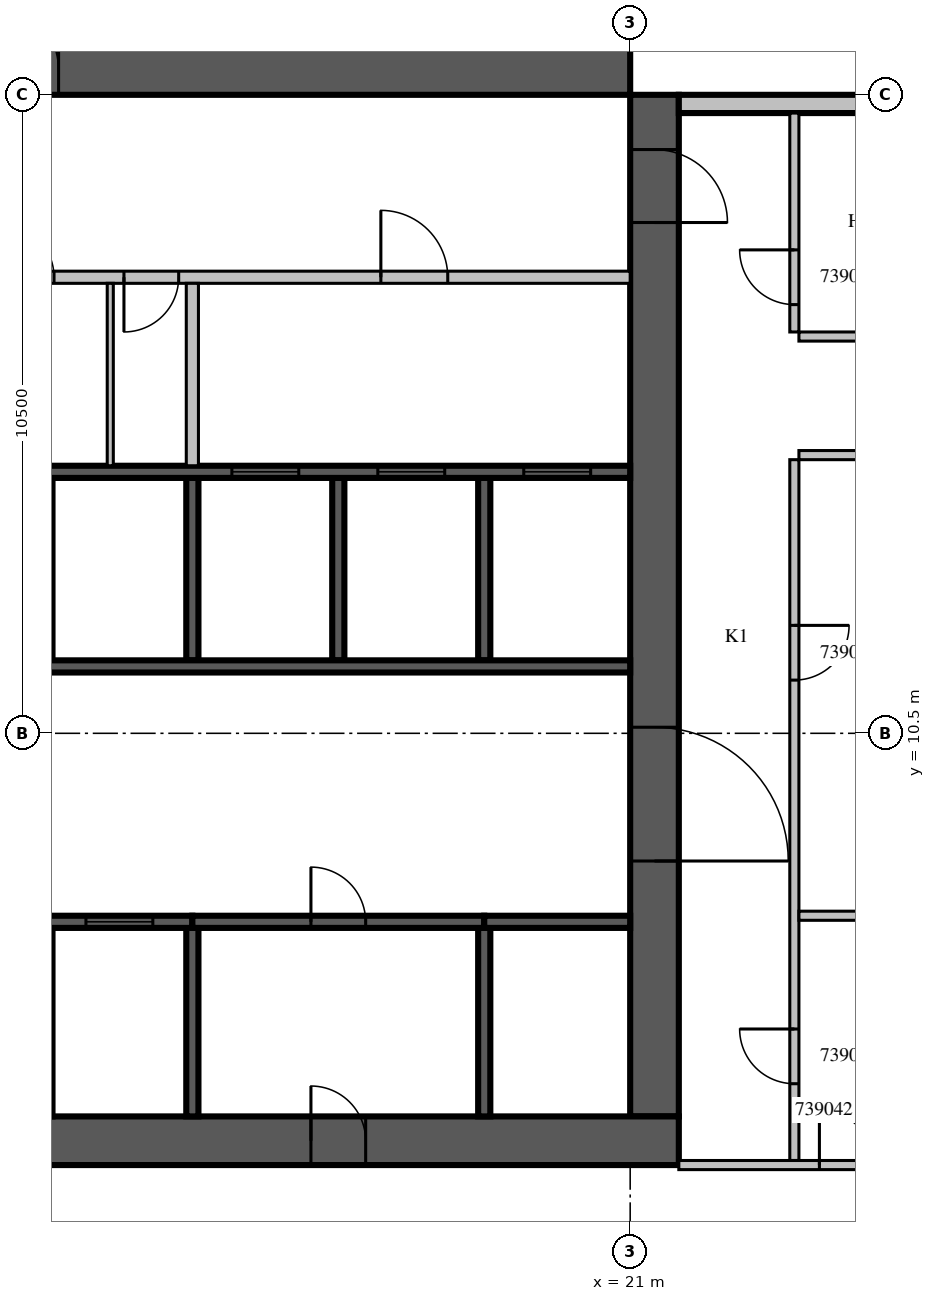
"""IFC4 building model, lengths in metres.
Left out: names, types, materials, properties, quantities, classifications, styles, units other than length and angle.
Written with IfcOpenShell. Run it as: python <this file> out.ifc"""

import sys

from ifc_helpers import new_model, si_unit, direction, frame, frame_2d, origin, place, context, subcontext, project, spatial, rectangle, extrude, source, transform, mapped, element, fill, save


model = new_model("IFC4")
c1 = context("Model", 3, precision=1e-05, world=origin(), true_north=direction((0.0, 1.0)))
c2 = subcontext(c1, "Body", "Model", "MODEL_VIEW")
j1 = project(units=[si_unit("LENGTHUNIT", "METRE"), si_unit("PLANEANGLEUNIT", "RADIAN")], contexts=[c1])
p1 = place(None, origin())
s1 = spatial("IfcSite", under=j1, at=p1, CompositionType="ELEMENT")
p2 = place(p1, origin())
s2 = spatial("IfcBuilding", under=s1, at=p2, CompositionType="ELEMENT")
p3 = place(p2, frame((0.0, 0.0, 181.6)))
s3 = spatial("IfcBuildingStorey", under=s2, at=p3, CompositionType="ELEMENT", Elevation=181.6)
m1 = source(origin(), c2, "Body", "SweptSolid", [
    extrude(rectangle(XDim=16.8, YDim=0.8, at=frame_2d((8.4, 0.0))), origin(), (0.0, 0.0, 1.0), 3.8),
])
p4 = place(p3, frame((21.4, 4.2, 0.0), z_axis=(0.0, 0.0, 1.0), x_axis=(0.0, 1.0, 0.0)))
e1 = element("IfcWall", 1, at=p4, inside=s3, PredefinedType="SHEAR", context=c2, shape_type="MappedRepresentation", body=[
    mapped(m1, transform((0.0, 0.0, 0.0), scale=1.0)),
])
m2 = source(origin(), c2, "Body", "SweptSolid", [
    extrude(rectangle(XDim=2.2, YDim=2.1, at=frame_2d((1.1, 1.05))), frame((0.0, 0.41, 0.0), z_axis=(0.0, -1.0, 0.0), x_axis=(1.0, 0.0, 0.0)), (0.0, 0.0, 1.0), 0.82),
])
p5 = place(p4, frame((4.2, 0.0, 0.0)))
e2 = element("IfcOpeningElement", 2, at=p5, cuts=e1, PredefinedType="OPENING", context=c2, shape_type="MappedRepresentation", body=[
    mapped(m2, transform((0.0, 0.0, 0.0), scale=1.0)),
])
m3 = source(origin(), c2, "Body", "SweptSolid", [
    extrude(rectangle(XDim=1.2, YDim=2.1, at=frame_2d((0.6, 1.05))), frame((0.0, 0.41, 0.0), z_axis=(0.0, -1.0, 0.0), x_axis=(1.0, 0.0, 0.0)), (0.0, 0.0, 1.0), 0.82),
])
p6 = place(p4, frame((14.7, 0.0, 0.0)))
e3 = element("IfcOpeningElement", 3, at=p6, cuts=e1, PredefinedType="OPENING", context=c2, shape_type="MappedRepresentation", body=[
    mapped(m3, transform((0.0, 0.0, 0.0), scale=1.0)),
])
m4 = source(origin(), c2, "Body", "SweptSolid", [
    extrude(rectangle(XDim=17.6, YDim=0.8, at=frame_2d((8.8, 0.0))), origin(), (0.0, 0.0, 1.0), 3.8),
])
p7 = place(p3, frame((4.2, 3.8, 0.0), z_axis=(0.0, 0.0, 1.0), x_axis=(1.0, 0.0, 0.0)))
e4 = element("IfcWall", 4, at=p7, inside=s3, PredefinedType="SHEAR", context=c2, shape_type="MappedRepresentation", body=[
    mapped(m4, transform((0.0, 0.0, 0.0), scale=1.0)),
])
m5 = source(origin(), c2, "Body", "SweptSolid", [
    extrude(rectangle(XDim=0.9, YDim=2.1, at=frame_2d((0.45, 1.05))), frame((0.0, 0.41, 0.0), z_axis=(0.0, -1.0, 0.0), x_axis=(1.0, 0.0, 0.0)), (0.0, 0.0, 1.0), 0.82),
])
p8 = place(p7, frame((11.55, 0.0, 0.0)))
e5 = element("IfcOpeningElement", 5, at=p8, cuts=e4, PredefinedType="OPENING", context=c2, shape_type="MappedRepresentation", body=[
    mapped(m5, transform((0.0, 0.0, 0.0), scale=1.0)),
])
p9 = place(p3, frame((4.2, 21.4, 0.0), z_axis=(0.0, 0.0, 1.0), x_axis=(1.0, 0.0, 0.0)))
e6 = element("IfcWall", 6, at=p9, inside=s3, PredefinedType="SHEAR", context=c2, shape_type="MappedRepresentation", body=[
    mapped(m1, transform((0.0, 0.0, 0.0), scale=1.0)),
])
p10 = place(p9, frame((6.2, 0.0, 0.0)))
e7 = element("IfcOpeningElement", 7, at=p10, cuts=e6, PredefinedType="OPENING", context=c2, shape_type="MappedRepresentation", body=[
    mapped(m3, transform((0.0, 0.0, 0.0), scale=1.0)),
])
m6 = source(origin(), c2, "Body", "SweptSolid", [
    extrude(rectangle(XDim=7.15, YDim=0.3, at=frame_2d((3.575, 0.0))), origin(), (0.0, 0.0, 1.0), 3.4),
])
p11 = place(p3, frame((28.95, 20.85, 0.0), z_axis=(0.0, 0.0, 1.0), x_axis=(-1.0, 0.0, 0.0)))
e8 = element("IfcWall", 8, at=p11, inside=s3, PredefinedType="STANDARD", context=c2, shape_type="MappedRepresentation", body=[
    mapped(m6, transform((0.0, 0.0, 0.0), scale=1.0)),
])
m7 = source(origin(), c2, "Body", "SweptSolid", [
    extrude(rectangle(XDim=3.0, YDim=2.3, at=frame_2d((1.5, 1.15))), frame((0.0, 0.16, 0.0), z_axis=(0.0, -1.0, 0.0), x_axis=(1.0, 0.0, 0.0)), (0.0, 0.0, 1.0), 0.32),
])
p12 = place(p11, frame((0.15, 0.0, 0.6)))
e9 = element("IfcOpeningElement", 9, at=p12, cuts=e8, PredefinedType="OPENING", context=c2, shape_type="MappedRepresentation", body=[
    mapped(m7, transform((0.0, 0.0, 0.0), scale=1.0)),
])
m8 = source(origin(), c2, "Body", "SweptSolid", [
    extrude(rectangle(XDim=3.1, YDim=0.2, at=frame_2d((1.55, 0.0))), origin(), (0.0, 0.0, 1.0), 3.4),
])
for number, where, z_axis, x_axis in (
    (10, (13.8, 4.2, 0.0), (0.0, 0.0, 1.0), (0.0, 1.0, 0.0)),
    (11, (18.6, 4.2, 0.0), (0.0, 0.0, 1.0), (0.0, 1.0, 0.0)),
):
    element("IfcWall", number, at=place(p3, frame(where, z_axis=z_axis, x_axis=x_axis)), inside=s3, PredefinedType="SOLIDWALL", context=c2, shape_type="MappedRepresentation", body=[
        mapped(m8, transform((0.0, 0.0, 0.0), scale=1.0)),
    ])
m9 = source(origin(), c2, "Body", "SweptSolid", [
    extrude(rectangle(XDim=3.0, YDim=0.2, at=frame_2d((1.5, 0.0))), origin(), (0.0, 0.0, 1.0), 3.8),
])
for number, where, z_axis, x_axis in (
    (12, (13.8, 11.7, 0.0), (0.0, 0.0, 1.0), (0.0, 1.0, 0.0)),
    (13, (16.2, 11.7, 0.0), (0.0, 0.0, 1.0), (0.0, 1.0, 0.0)),
    (14, (18.6, 11.7, 0.0), (0.0, 0.0, 1.0), (0.0, 1.0, 0.0)),
):
    element("IfcWall", number, at=place(p3, frame(where, z_axis=z_axis, x_axis=x_axis)), inside=s3, PredefinedType="SOLIDWALL", context=c2, shape_type="MappedRepresentation", body=[
        mapped(m9, transform((0.0, 0.0, 0.0), scale=1.0)),
    ])
m10 = source(origin(), c2, "Body", "SweptSolid", [
    extrude(rectangle(XDim=9.6, YDim=0.2, at=frame_2d((4.8, 0.0))), origin(), (0.0, 0.0, 1.0), 3.8),
])
p13 = place(p3, frame((4.2, 7.4, 0.0), z_axis=(0.0, 0.0, 1.0), x_axis=(1.0, 0.0, 0.0)))
e15 = element("IfcWall", 15, at=p13, inside=s3, PredefinedType="SOLIDWALL", context=c2, shape_type="MappedRepresentation", body=[
    mapped(m10, transform((0.0, 0.0, 0.0), scale=1.0)),
])
m11 = source(origin(), c2, "Body", "SweptSolid", [
    extrude(rectangle(XDim=1.1, YDim=2.1, at=frame_2d((0.55, 1.05))), frame((0.0, 0.11, 0.0), z_axis=(0.0, -1.0, 0.0), x_axis=(1.0, 0.0, 0.0)), (0.0, 0.0, 1.0), 0.22),
])
p14 = place(p13, frame((0.65, 0.0, 0.0)))
e16 = element("IfcOpeningElement", 16, at=p14, cuts=e15, PredefinedType="OPENING", context=c2, shape_type="MappedRepresentation", body=[
    mapped(m11, transform((0.0, 0.0, 0.0), scale=1.0)),
])
p15 = place(p13, frame((3.05, 0.0, 0.0)))
e17 = element("IfcOpeningElement", 17, at=p15, cuts=e15, PredefinedType="OPENING", context=c2, shape_type="MappedRepresentation", body=[
    mapped(m11, transform((0.0, 0.0, 0.0), scale=1.0)),
])
p16 = place(p13, frame((5.45, 0.0, 0.0)))
e18 = element("IfcOpeningElement", 18, at=p16, cuts=e15, PredefinedType="OPENING", context=c2, shape_type="MappedRepresentation", body=[
    mapped(m11, transform((0.0, 0.0, 0.0), scale=1.0)),
])
p17 = place(p13, frame((7.85, 0.0, 0.0)))
e19 = element("IfcOpeningElement", 19, at=p17, cuts=e15, PredefinedType="OPENING", context=c2, shape_type="MappedRepresentation", body=[
    mapped(m11, transform((0.0, 0.0, 0.0), scale=1.0)),
])
m12 = source(origin(), c2, "Body", "SweptSolid", [
    extrude(rectangle(XDim=4.8, YDim=0.2, at=frame_2d((2.4, 0.0))), origin(), (0.0, 0.0, 1.0), 3.4),
])
p18 = place(p3, frame((13.8, 7.4, 0.0), z_axis=(0.0, 0.0, 1.0), x_axis=(1.0, 0.0, 0.0)))
e20 = element("IfcWall", 20, at=p18, inside=s3, PredefinedType="SOLIDWALL", context=c2, shape_type="MappedRepresentation", body=[
    mapped(m12, transform((0.0, 0.0, 0.0), scale=1.0)),
])
m13 = source(origin(), c2, "Body", "SweptSolid", [
    extrude(rectangle(XDim=0.9, YDim=2.1, at=frame_2d((0.45, 1.05))), frame((0.0, 0.11, 0.0), z_axis=(0.0, -1.0, 0.0), x_axis=(1.0, 0.0, 0.0)), (0.0, 0.0, 1.0), 0.22),
])
p19 = place(p18, frame((1.95, 0.0, 0.0)))
e21 = element("IfcOpeningElement", 21, at=p19, cuts=e20, PredefinedType="OPENING", context=c2, shape_type="MappedRepresentation", body=[
    mapped(m13, transform((0.0, 0.0, 0.0), scale=1.0)),
])
m14 = source(origin(), c2, "Body", "SweptSolid", [
    extrude(rectangle(XDim=2.4, YDim=0.2, at=frame_2d((1.2, 0.0))), origin(), (0.0, 0.0, 1.0), 3.8),
])
p20 = place(p3, frame((18.6, 7.4, 0.0), z_axis=(0.0, 0.0, 1.0), x_axis=(1.0, 0.0, 0.0)))
e22 = element("IfcWall", 22, at=p20, inside=s3, PredefinedType="SOLIDWALL", context=c2, shape_type="MappedRepresentation", body=[
    mapped(m14, transform((0.0, 0.0, 0.0), scale=1.0)),
])
p21 = place(p3, frame((11.4, 11.6, 0.0), z_axis=(0.0, 0.0, 1.0), x_axis=(1.0, 0.0, 0.0)))
e23 = element("IfcWall", 23, at=p21, inside=s3, PredefinedType="SOLIDWALL", context=c2, shape_type="MappedRepresentation", body=[
    mapped(m10, transform((0.0, 0.0, 0.0), scale=1.0)),
])
p22 = place(p3, frame((11.4, 14.8, 0.0), z_axis=(0.0, 0.0, 1.0), x_axis=(1.0, 0.0, 0.0)))
e24 = element("IfcWall", 24, at=p22, inside=s3, PredefinedType="SOLIDWALL", context=c2, shape_type="MappedRepresentation", body=[
    mapped(m10, transform((0.0, 0.0, 0.0), scale=1.0)),
])
p23 = place(p22, frame((3.05, 0.0, 0.0)))
e25 = element("IfcOpeningElement", 25, at=p23, cuts=e24, PredefinedType="OPENING", context=c2, shape_type="MappedRepresentation", body=[
    mapped(m11, transform((0.0, 0.0, 0.0), scale=1.0)),
])
p24 = place(p22, frame((5.45, 0.0, 0.0)))
e26 = element("IfcOpeningElement", 26, at=p24, cuts=e24, PredefinedType="OPENING", context=c2, shape_type="MappedRepresentation", body=[
    mapped(m11, transform((0.0, 0.0, 0.0), scale=1.0)),
])
p25 = place(p22, frame((7.85, 0.0, 0.0)))
e27 = element("IfcOpeningElement", 27, at=p25, cuts=e24, PredefinedType="OPENING", context=c2, shape_type="MappedRepresentation", body=[
    mapped(m11, transform((0.0, 0.0, 0.0), scale=1.0)),
])
m15 = source(origin(), c2, "Body", "SweptSolid", [
    extrude(rectangle(XDim=11.45, YDim=0.2, at=frame_2d((5.725, 0.0))), origin(), (0.0, 0.0, 1.0), 3.4),
])
p26 = place(p3, frame((9.55, 18.0, 0.0), z_axis=(0.0, 0.0, 1.0), x_axis=(1.0, 0.0, 0.0)))
e28 = element("IfcWall", 28, at=p26, inside=s3, PredefinedType="PARTITIONING", context=c2, shape_type="MappedRepresentation", body=[
    mapped(m15, transform((0.0, 0.0, 0.0), scale=1.0)),
])
p27 = place(p26, frame((1.075, 0.0, 0.0)))
e29 = element("IfcOpeningElement", 29, at=p27, cuts=e28, PredefinedType="OPENING", context=c2, shape_type="MappedRepresentation", body=[
    mapped(m13, transform((0.0, 0.0, 0.0), scale=1.0)),
])
p28 = place(p26, frame((3.125, 0.0, 0.0)))
e30 = element("IfcOpeningElement", 30, at=p28, cuts=e28, PredefinedType="OPENING", context=c2, shape_type="MappedRepresentation", body=[
    mapped(m13, transform((0.0, 0.0, 0.0), scale=1.0)),
])
p29 = place(p26, frame((7.35, 0.0, 0.0)))
e31 = element("IfcOpeningElement", 31, at=p29, cuts=e28, PredefinedType="OPENING", context=c2, shape_type="MappedRepresentation", body=[
    mapped(m11, transform((0.0, 0.0, 0.0), scale=1.0)),
])
m16 = source(origin(), c2, "Body", "SweptSolid", [
    extrude(rectangle(XDim=3.0, YDim=0.2, at=frame_2d((1.5, 0.0))), origin(), (0.0, 0.0, 1.0), 3.4),
])
p30 = place(p3, frame((13.8, 14.9, 0.0), z_axis=(0.0, 0.0, 1.0), x_axis=(0.0, 1.0, 0.0)))
e32 = element("IfcWall", 32, at=p30, inside=s3, PredefinedType="PARTITIONING", context=c2, shape_type="MappedRepresentation", body=[
    mapped(m16, transform((0.0, 0.0, 0.0), scale=1.0)),
])
m17 = source(origin(), c2, "Body", "SweptSolid", [
    extrude(rectangle(XDim=3.0, YDim=0.1, at=frame_2d((1.5, 0.0))), origin(), (0.0, 0.0, 1.0), 3.4),
])
p31 = place(p3, frame((12.45, 14.9, 0.0), z_axis=(0.0, 0.0, 1.0), x_axis=(0.0, 1.0, 0.0)))
e33 = element("IfcWall", 33, at=p31, inside=s3, PredefinedType="PARTITIONING", context=c2, shape_type="MappedRepresentation", body=[
    mapped(m17, transform((0.0, 0.0, 0.0), scale=1.0)),
])
p32 = place(p3, frame((23.7, 15.0, 0.0), z_axis=(0.0, 0.0, 1.0), x_axis=(0.0, -1.0, 0.0)))
e34 = element("IfcWall", 34, at=p32, inside=s3, PredefinedType="PARTITIONING", context=c2, shape_type="SweptSolid", body=[
    extrude(rectangle(XDim=11.525, YDim=0.15, at=frame_2d((5.763, 0.0))), origin(), (0.0, 0.0, 1.0), 3.4),
])
m18 = source(origin(), c2, "Body", "SweptSolid", [
    extrude(rectangle(XDim=0.9, YDim=2.1, at=frame_2d((0.45, 1.05))), frame((0.0, 0.085, 0.0), z_axis=(0.0, -1.0, 0.0), x_axis=(1.0, 0.0, 0.0)), (0.0, 0.0, 1.0), 0.17),
])
p33 = place(p32, frame((9.363, 0.0, 0.0)))
e35 = element("IfcOpeningElement", 35, at=p33, cuts=e34, PredefinedType="OPENING", context=c2, shape_type="MappedRepresentation", body=[
    mapped(m18, transform((0.0, 0.0, 0.0), scale=1.0)),
])
p34 = place(p32, frame((2.725, 0.0, 0.0)))
e36 = element("IfcOpeningElement", 36, at=p34, cuts=e34, PredefinedType="OPENING", context=c2, shape_type="MappedRepresentation", body=[
    mapped(m18, transform((0.0, 0.0, 0.0), scale=1.0)),
])
m19 = source(origin(), c2, "Body", "SweptSolid", [
    extrude(rectangle(XDim=3.6, YDim=0.15, at=frame_2d((1.8, 0.0))), origin(), (0.0, 0.0, 1.0), 3.4),
])
p35 = place(p3, frame((23.7, 20.7, 0.0), z_axis=(0.0, 0.0, 1.0), x_axis=(0.0, -1.0, 0.0)))
e37 = element("IfcWall", 37, at=p35, inside=s3, PredefinedType="PARTITIONING", context=c2, shape_type="MappedRepresentation", body=[
    mapped(m19, transform((0.0, 0.0, 0.0), scale=1.0)),
])
p36 = place(p35, frame((2.25, 0.0, 0.0)))
e38 = element("IfcOpeningElement", 38, at=p36, cuts=e37, PredefinedType="OPENING", context=c2, shape_type="MappedRepresentation", body=[
    mapped(m18, transform((0.0, 0.0, 0.0), scale=1.0)),
])
m20 = source(origin(), c2, "Body", "SweptSolid", [
    extrude(rectangle(XDim=5.55, YDim=0.15, at=frame_2d((2.775, 0.0))), origin(), (0.0, 0.0, 1.0), 3.4),
])
for number, where, z_axis, x_axis in (
    (39, (29.325, 7.5, 0.0), (0.0, 0.0, 1.0), (-1.0, 0.0, 0.0)),
    (40, (29.325, 15.075, 0.0), (0.0, 0.0, 1.0), (-1.0, 0.0, 0.0)),
    (41, (23.775, 17.025, 0.0), (0.0, 0.0, 1.0), (1.0, 0.0, 0.0)),
):
    element("IfcWall", number, at=place(p3, frame(where, z_axis=z_axis, x_axis=x_axis)), inside=s3, PredefinedType="PARTITIONING", context=c2, shape_type="MappedRepresentation", body=[
        mapped(m20, transform((0.0, 0.0, 0.0), scale=1.0)),
    ])
p37 = place(p3, frame((21.8, 3.4, 0.0), z_axis=(0.0, 0.0, 1.0), x_axis=(1.0, 0.0, 0.0)))
e42 = element("IfcWall", 42, at=p37, inside=s3, PredefinedType="PARTITIONING", context=c2, shape_type="SweptSolid", body=[
    extrude(rectangle(XDim=7.525, YDim=0.15, at=frame_2d((3.763, 0.0))), origin(), (0.0, 0.0, 1.0), 3.4),
])
m21 = source(origin(), c2, "Body", "SweptSolid", [
    extrude(rectangle(XDim=1.0, YDim=2.1, at=frame_2d((0.5, 1.05))), frame((0.0, 0.085, 0.0), z_axis=(0.0, -1.0, 0.0), x_axis=(1.0, 0.0, 0.0)), (0.0, 0.0, 1.0), 0.17),
])
p38 = place(p37, frame((3.3, 0.0, 0.0)))
e43 = element("IfcOpeningElement", 43, at=p38, cuts=e42, PredefinedType="OPENING", context=c2, shape_type="MappedRepresentation", body=[
    mapped(m21, transform((0.0, 0.0, 0.0), scale=1.0)),
])
p39 = place(p37, frame((2.312, 0.0, 0.0)))
e44 = element("IfcOpeningElement", 44, at=p39, cuts=e42, PredefinedType="OPENING", context=c2, shape_type="MappedRepresentation", body=[
    mapped(m18, transform((0.0, 0.0, 0.0), scale=1.0)),
])
m22 = source(origin(), c2, "Body", "SweptSolid", [
    extrude(rectangle(XDim=1.1, YDim=2.1, at=frame_2d((0.55, 1.05))), frame((0.0, 0.025, 0.0), z_axis=(0.0, -1.0, 0.0), x_axis=(1.0, 0.0, 0.0)), (0.0, 0.0, 1.0), 0.05),
])
p40 = place(p17, origin())
e45 = element("IfcDoor", 45, at=p40, inside=s3, OperationType="SLIDING_TO_LEFT", PredefinedType="DOOR", context=c2, shape_type="MappedRepresentation", body=[
    mapped(m22, transform((0.0, 0.0, 0.0), scale=1.0)),
])
fill(e19, e45)
m23 = source(origin(), c2, "Body", "SweptSolid", [
    extrude(rectangle(XDim=0.9, YDim=2.1, at=frame_2d((0.45, 1.05))), frame((0.0, 0.025, 0.0), z_axis=(0.0, -1.0, 0.0), x_axis=(1.0, 0.0, 0.0)), (0.0, 0.0, 1.0), 0.05),
])
p41 = place(p19, origin())
e46 = element("IfcDoor", 46, at=p41, inside=s3, OperationType="SINGLE_SWING_LEFT", PredefinedType="DOOR", context=c2, shape_type="MappedRepresentation", body=[
    mapped(m23, transform((0.0, 0.0, 0.0), scale=1.0)),
])
fill(e21, e46)
p42 = place(p23, origin())
e47 = element("IfcDoor", 47, at=p42, inside=s3, OperationType="SLIDING_TO_LEFT", PredefinedType="DOOR", context=c2, shape_type="MappedRepresentation", body=[
    mapped(m22, transform((0.0, 0.0, 0.0), scale=1.0)),
])
fill(e25, e47)
p43 = place(p24, origin())
e48 = element("IfcDoor", 48, at=p43, inside=s3, OperationType="SLIDING_TO_LEFT", PredefinedType="DOOR", context=c2, shape_type="MappedRepresentation", body=[
    mapped(m22, transform((0.0, 0.0, 0.0), scale=1.0)),
])
fill(e26, e48)
p44 = place(p25, origin())
e49 = element("IfcDoor", 49, at=p44, inside=s3, OperationType="SLIDING_TO_LEFT", PredefinedType="DOOR", context=c2, shape_type="MappedRepresentation", body=[
    mapped(m22, transform((0.0, 0.0, 0.0), scale=1.0)),
])
fill(e27, e49)
p45 = place(p27, origin())
e50 = element("IfcDoor", 50, at=p45, inside=s3, OperationType="SINGLE_SWING_LEFT", PredefinedType="DOOR", context=c2, shape_type="MappedRepresentation", body=[
    mapped(m23, transform((0.0, 0.0, 0.0), scale=1.0)),
])
fill(e29, e50)
p46 = place(p28, origin())
e51 = element("IfcDoor", 51, at=p46, inside=s3, OperationType="SINGLE_SWING_RIGHT", PredefinedType="DOOR", context=c2, shape_type="MappedRepresentation", body=[
    mapped(m23, transform((0.0, 0.0, 0.0), scale=1.0)),
])
fill(e30, e51)
p47 = place(p29, origin())
e52 = element("IfcDoor", 52, at=p47, inside=s3, OperationType="SINGLE_SWING_LEFT", PredefinedType="DOOR", context=c2, shape_type="MappedRepresentation", body=[
    mapped(m22, transform((0.0, 0.0, 0.0), scale=1.0)),
])
fill(e31, e52)
m24 = source(origin(), c2, "Body", "SweptSolid", [
    extrude(rectangle(XDim=2.2, YDim=2.1, at=frame_2d((1.1, 1.05))), frame((0.0, 0.025, 0.0), z_axis=(0.0, -1.0, 0.0), x_axis=(1.0, 0.0, 0.0)), (0.0, 0.0, 1.0), 0.05),
])
p48 = place(p5, origin())
e53 = element("IfcDoor", 53, at=p48, inside=s3, OperationType="DOUBLE_DOOR_SINGLE_SWING", PredefinedType="DOOR", context=c2, shape_type="MappedRepresentation", body=[
    mapped(m24, transform((0.0, 0.0, 0.0), scale=1.0)),
])
fill(e2, e53)
m25 = source(origin(), c2, "Body", "SweptSolid", [
    extrude(rectangle(XDim=1.2, YDim=2.1, at=frame_2d((0.6, 1.05))), frame((0.0, 0.025, 0.0), z_axis=(0.0, -1.0, 0.0), x_axis=(1.0, 0.0, 0.0)), (0.0, 0.0, 1.0), 0.05),
])
p49 = place(p10, origin())
e54 = element("IfcDoor", 54, at=p49, inside=s3, OperationType="SINGLE_SWING_LEFT", PredefinedType="DOOR", context=c2, shape_type="MappedRepresentation", body=[
    mapped(m25, transform((0.0, 0.0, 0.0), scale=1.0)),
])
fill(e7, e54)
p50 = place(p6, origin())
e55 = element("IfcDoor", 55, at=p50, inside=s3, OperationType="SINGLE_SWING_RIGHT", PredefinedType="DOOR", context=c2, shape_type="MappedRepresentation", body=[
    mapped(m25, transform((0.0, 0.0, 0.0), scale=1.0)),
])
fill(e3, e55)
p51 = place(p8, origin())
e56 = element("IfcDoor", 56, at=p51, inside=s3, OperationType="SINGLE_SWING_LEFT", PredefinedType="DOOR", context=c2, shape_type="MappedRepresentation", body=[
    mapped(m23, transform((0.0, 0.0, 0.0), scale=1.0)),
])
fill(e5, e56)
p52 = place(p33, origin())
e57 = element("IfcDoor", 57, at=p52, inside=s3, OperationType="SINGLE_SWING_RIGHT", PredefinedType="DOOR", context=c2, shape_type="MappedRepresentation", body=[
    mapped(m23, transform((0.0, 0.0, 0.0), scale=1.0)),
])
fill(e35, e57)
p53 = place(p34, origin())
e58 = element("IfcDoor", 58, at=p53, inside=s3, OperationType="SINGLE_SWING_LEFT", PredefinedType="DOOR", context=c2, shape_type="MappedRepresentation", body=[
    mapped(m23, transform((0.0, 0.0, 0.0), scale=1.0)),
])
fill(e36, e58)
p54 = place(p36, origin())
e59 = element("IfcDoor", 59, at=p54, inside=s3, OperationType="SINGLE_SWING_RIGHT", PredefinedType="DOOR", context=c2, shape_type="MappedRepresentation", body=[
    mapped(m23, transform((0.0, 0.0, 0.0), scale=1.0)),
])
fill(e38, e59)
p55 = place(p39, origin())
e60 = element("IfcDoor", 60, at=p55, inside=s3, OperationType="SINGLE_SWING_LEFT", PredefinedType="DOOR", context=c2, shape_type="MappedRepresentation", body=[
    mapped(m23, transform((0.0, 0.0, 0.0), scale=1.0)),
])
fill(e44, e60)
save(model, sys.argv[1])
